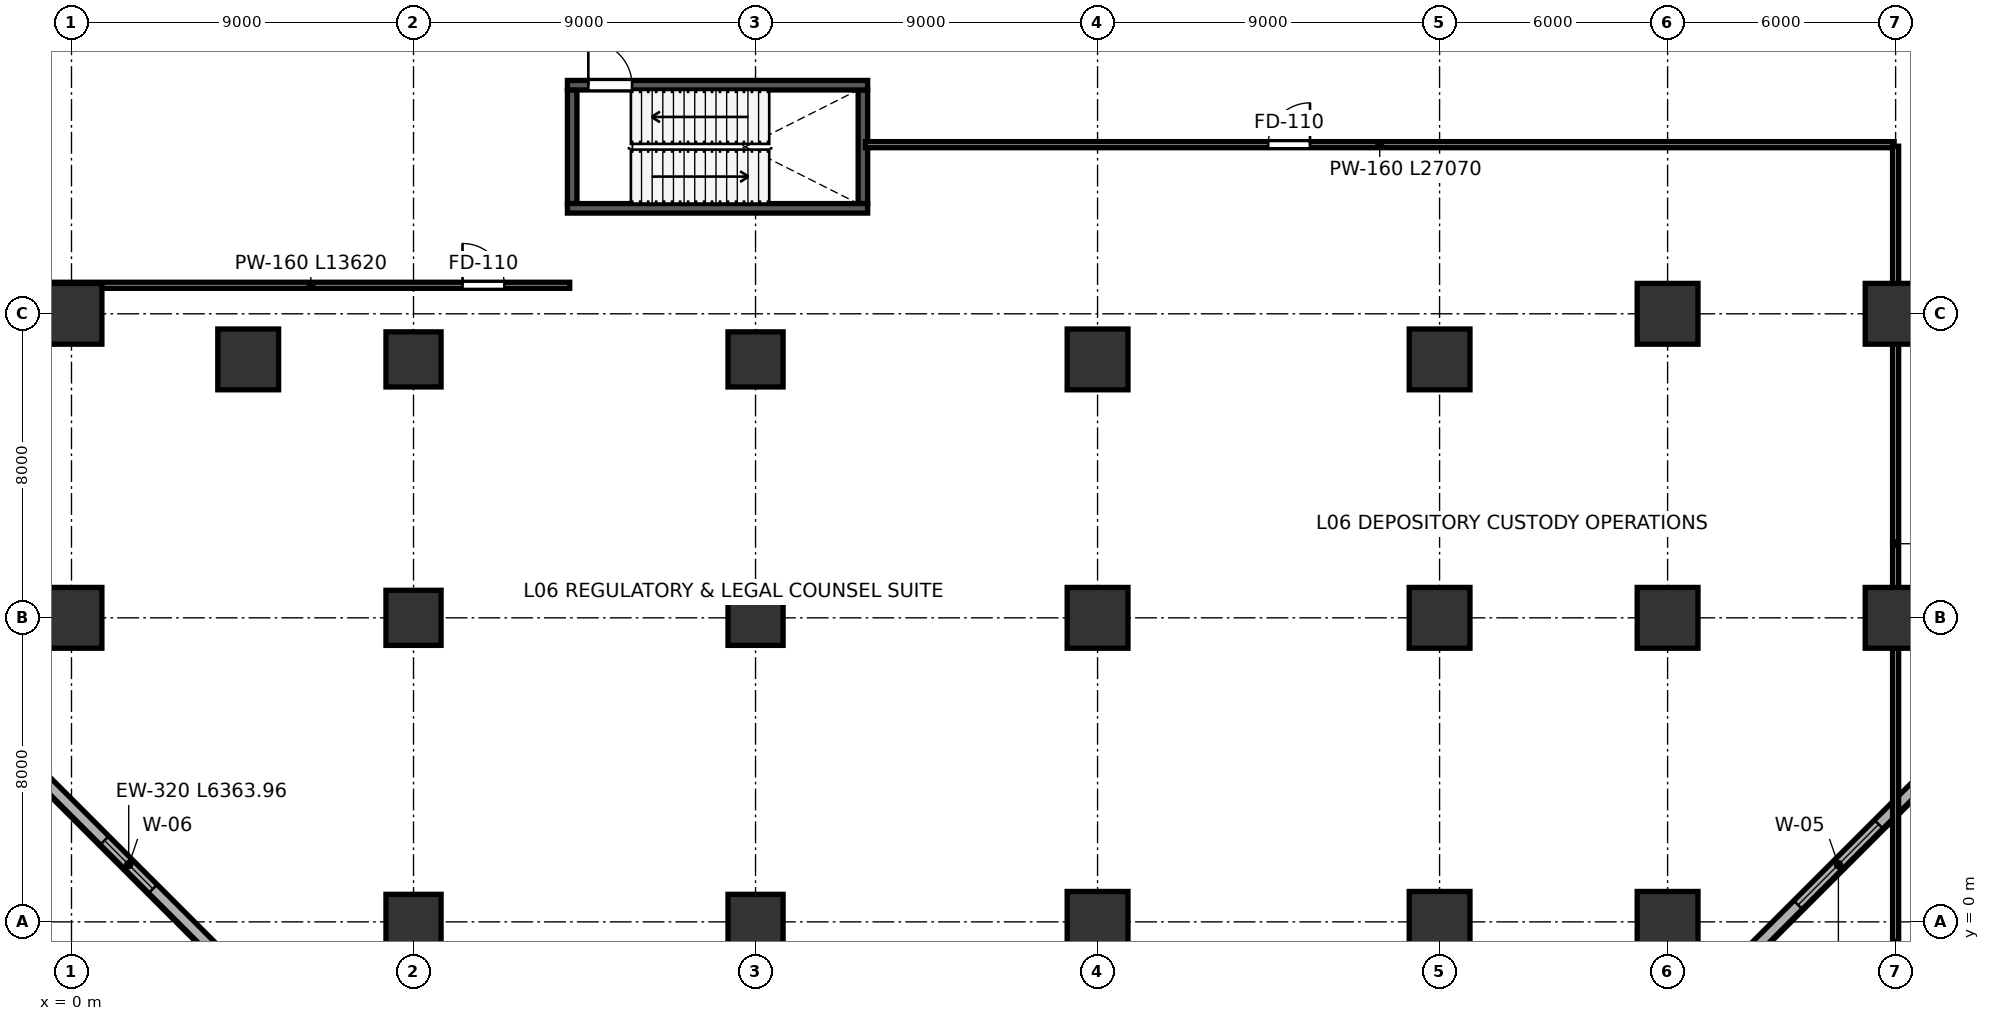
"""IFC4 building model, lengths in metres.
Left out: names, types, materials, properties, quantities, classifications, styles, units other than length and angle.
Written with IfcOpenShell. Run it as: python <this file> out.ifc"""

import sys

from ifc_helpers import new_model, si_unit, direction, frame, frame_2d, origin, origin_2d, place, context, subcontext, project, spatial, rectangle, extrude, clip, halfspace, source, transform, mapped, element, fill, save


model = new_model("IFC4")
c1 = context("Model", 3, precision=1e-05, world=origin(), true_north=direction((0.0, 1.0)))
c2 = subcontext(c1, "Body", "Model", "MODEL_VIEW")
j1 = project(units=[si_unit("LENGTHUNIT", "METRE"), si_unit("PLANEANGLEUNIT", "RADIAN")], contexts=[c1])
p1 = place(None, origin())
s1 = spatial("IfcSite", under=j1, at=p1, CompositionType="ELEMENT")
p2 = place(p1, origin())
s2 = spatial("IfcBuilding", under=s1, at=p2, CompositionType="ELEMENT")
p3 = place(p2, frame((0.0, 0.0, 28.0)))
s3 = spatial("IfcBuildingStorey", under=s2, at=p3, CompositionType="ELEMENT", Elevation=28.0)
m1 = source(origin(), c2, "Body", "SweptSolid", [
    extrude(rectangle(XDim=1.6, YDim=1.6, at=origin_2d()), origin(), (0.0, 0.0, 1.0), 4.599),
])
for number, where, z_axis, x_axis in (
    (1, (0.0, 8.0, 0.001), (0.0, 0.0, 1.0), (1.0, 0.0, 0.0)),
    (2, (0.0, 16.0, 0.001), (0.0, 0.0, 1.0), (1.0, 0.0, 0.0)),
):
    element("IfcColumn", number, at=place(p3, frame(where, z_axis=z_axis, x_axis=x_axis)), inside=s3, PredefinedType="COLUMN", context=c2, shape_type="MappedRepresentation", body=[
        mapped(m1, transform((0.0, 0.0, 0.0), scale=1.0)),
    ])
m2 = source(origin(), c2, "Body", "SweptSolid", [
    extrude(rectangle(XDim=1.45, YDim=1.45, at=origin_2d()), origin(), (0.0, 0.0, 1.0), 4.599),
])
p4 = place(p3, frame((9.0, 0.0, 0.001), z_axis=(0.0, 0.0, 1.0), x_axis=(1.0, 0.0, 0.0)))
e3 = element("IfcColumn", 3, at=p4, inside=s3, PredefinedType="COLUMN", context=c2, shape_type="MappedRepresentation", body=[
    mapped(m2, transform((0.0, 0.0, 0.0), scale=1.0)),
])
m3 = source(origin(), c2, "Body", "SweptSolid", [
    extrude(rectangle(XDim=1.45, YDim=1.45, at=origin_2d()), origin(), (0.0, 0.0, 1.0), 4.599),
])
p5 = place(p3, frame((9.0, 8.0, 0.001), z_axis=(0.0, 0.0, 1.0), x_axis=(1.0, 0.0, 0.0)))
e4 = element("IfcColumn", 4, at=p5, inside=s3, PredefinedType="COLUMN", context=c2, shape_type="MappedRepresentation", body=[
    mapped(m3, transform((0.0, 0.0, 0.0), scale=1.0)),
])
p6 = place(p3, frame((9.0, 14.8, 0.0), z_axis=(-0.151013331323, 0.114858023163, 0.981836344957), x_axis=(-0.605376865392, -0.795938974324, 0.0)))
e5 = element("IfcColumn", 5, at=p6, inside=s3, PredefinedType="COLUMN", context=c2, shape_type="Clipping", body=[
    clip(clip(extrude(rectangle(XDim=1.45, YDim=1.45, at=origin_2d()), origin(), (0.0, 0.0, 1.0), 4.889), halfspace(frame((0.0, 0.0, 0.141), z_axis=(0.0, 0.0, -1.0), x_axis=(1.0, 0.0, 0.0)), False)), halfspace(frame((0.0, 0.0, 4.748), z_axis=(0.0, 0.0, 1.0), x_axis=(1.0, 0.0, 0.0)), False)),
])
p7 = place(p3, frame((18.0, 0.0, 0.001), z_axis=(0.0, 0.0, 1.0), x_axis=(1.0, 0.0, 0.0)))
e6 = element("IfcColumn", 6, at=p7, inside=s3, PredefinedType="COLUMN", context=c2, shape_type="MappedRepresentation", body=[
    mapped(m2, transform((0.0, 0.0, 0.0), scale=1.0)),
])
p8 = place(p3, frame((18.0, 8.0, 0.001), z_axis=(0.0, 0.0, 1.0), x_axis=(1.0, 0.0, 0.0)))
e7 = element("IfcColumn", 7, at=p8, inside=s3, PredefinedType="COLUMN", context=c2, shape_type="MappedRepresentation", body=[
    mapped(m3, transform((0.0, 0.0, 0.0), scale=1.0)),
])
p9 = place(p3, frame((18.0, 14.8, 0.0), z_axis=(-0.153644648635, 0.034757141829, 0.987514690036), x_axis=(-0.220642524596, -0.975354743844, 0.0)))
e8 = element("IfcColumn", 8, at=p9, inside=s3, PredefinedType="COLUMN", context=c2, shape_type="Clipping", body=[
    clip(clip(extrude(rectangle(XDim=1.45, YDim=1.45, at=origin_2d()), origin(), (0.0, 0.0, 1.0), 4.861), halfspace(frame((0.0, 0.0, 0.116), z_axis=(0.0, 0.0, -1.0), x_axis=(1.0, 0.0, 0.0)), False)), halfspace(frame((0.0, 0.0, 4.744), z_axis=(0.0, 0.0, 1.0), x_axis=(1.0, 0.0, 0.0)), False)),
])
p10 = place(p3, frame((27.0, 0.0, 0.001), z_axis=(0.0, 0.0, 1.0), x_axis=(1.0, 0.0, 0.0)))
e9 = element("IfcColumn", 9, at=p10, inside=s3, PredefinedType="COLUMN", context=c2, shape_type="MappedRepresentation", body=[
    mapped(m1, transform((0.0, 0.0, 0.0), scale=1.0)),
])
m4 = source(origin(), c2, "Body", "SweptSolid", [
    extrude(rectangle(XDim=1.6, YDim=1.6, at=origin_2d()), origin(), (0.0, 0.0, 1.0), 4.599),
])
p11 = place(p3, frame((27.0, 8.0, 0.001), z_axis=(0.0, 0.0, 1.0), x_axis=(1.0, 0.0, 0.0)))
e10 = element("IfcColumn", 10, at=p11, inside=s3, PredefinedType="COLUMN", context=c2, shape_type="MappedRepresentation", body=[
    mapped(m4, transform((0.0, 0.0, 0.0), scale=1.0)),
])
p12 = place(p3, frame((27.0, 14.8, 0.0), z_axis=(-0.155338879297, -0.04597428544, 0.986790858114), x_axis=(0.283792954128, -0.958885581906, 0.0)))
e11 = element("IfcColumn", 11, at=p12, inside=s3, PredefinedType="COLUMN", context=c2, shape_type="Clipping", body=[
    clip(clip(extrude(rectangle(XDim=1.6, YDim=1.6, at=origin_2d()), origin(), (0.0, 0.0, 1.0), 4.864), halfspace(frame((0.0, 0.0, 0.132), z_axis=(0.0, 0.0, -1.0), x_axis=(1.0, 0.0, 0.0)), False)), halfspace(frame((0.0, 0.0, 4.732), z_axis=(0.0, 0.0, 1.0), x_axis=(1.0, 0.0, 0.0)), False)),
])
p13 = place(p3, frame((36.0, 0.0, 0.001), z_axis=(0.0, 0.0, 1.0), x_axis=(1.0, 0.0, 0.0)))
e12 = element("IfcColumn", 12, at=p13, inside=s3, PredefinedType="COLUMN", context=c2, shape_type="MappedRepresentation", body=[
    mapped(m1, transform((0.0, 0.0, 0.0), scale=1.0)),
])
p14 = place(p3, frame((36.0, 8.0, 0.001), z_axis=(0.0, 0.0, 1.0), x_axis=(1.0, 0.0, 0.0)))
e13 = element("IfcColumn", 13, at=p14, inside=s3, PredefinedType="COLUMN", context=c2, shape_type="MappedRepresentation", body=[
    mapped(m4, transform((0.0, 0.0, 0.0), scale=1.0)),
])
p15 = place(p3, frame((36.0, 24.0, 0.0), z_axis=(-0.074738817011, -0.128755970086, 0.988855909321), x_axis=(0.864855191365, -0.502021411863, 0.0)))
e14 = element("IfcColumn", 14, at=p15, inside=s3, PredefinedType="COLUMN", context=c2, shape_type="Clipping", body=[
    clip(clip(extrude(rectangle(XDim=1.6, YDim=1.6, at=origin_2d()), origin(), (0.0, 0.0, 1.0), 4.854), halfspace(frame((0.0, 0.0, 0.121), z_axis=(0.0, 0.0, -1.0), x_axis=(1.0, 0.0, 0.0)), False)), halfspace(frame((0.0, 0.0, 4.733), z_axis=(0.0, 0.0, 1.0), x_axis=(1.0, 0.0, 0.0)), False)),
])
p16 = place(p3, frame((36.0, 14.8, 0.001), z_axis=(0.0, 0.0, 1.0), x_axis=(1.0, 0.0, 0.0)))
e15 = element("IfcColumn", 15, at=p16, inside=s3, PredefinedType="COLUMN", context=c2, shape_type="MappedRepresentation", body=[
    mapped(m4, transform((0.0, 0.0, 0.0), scale=1.0)),
])
p17 = place(p3, frame((42.0, 0.0, 0.001), z_axis=(0.0, 0.0, 1.0), x_axis=(1.0, 0.0, 0.0)))
e16 = element("IfcColumn", 16, at=p17, inside=s3, PredefinedType="COLUMN", context=c2, shape_type="MappedRepresentation", body=[
    mapped(m1, transform((0.0, 0.0, 0.0), scale=1.0)),
])
m5 = source(origin(), c2, "Body", "SweptSolid", [
    extrude(rectangle(XDim=1.6, YDim=1.6, at=origin_2d()), origin(), (0.0, 0.0, 1.0), 4.799),
])
for number, where, z_axis, x_axis in (
    (17, (42.0, 8.0, 0.001), (0.0, 0.0, 1.0), (1.0, 0.0, 0.0)),
    (18, (42.0, 16.0, 0.001), (0.0, 0.0, 1.0), (1.0, 0.0, 0.0)),
):
    element("IfcColumn", number, at=place(p3, frame(where, z_axis=z_axis, x_axis=x_axis)), inside=s3, PredefinedType="COLUMN", context=c2, shape_type="MappedRepresentation", body=[
        mapped(m5, transform((0.0, 0.0, 0.0), scale=1.0)),
    ])
p18 = place(p3, frame((42.0, 24.0, 0.0), z_axis=(-0.075259886608, -0.181142417601, 0.980572982502), x_axis=(0.923467612917, -0.383676384331, 0.0)))
e19 = element("IfcColumn", 19, at=p18, inside=s3, PredefinedType="COLUMN", context=c2, shape_type="Clipping", body=[
    clip(clip(extrude(rectangle(XDim=1.6, YDim=1.6, at=origin_2d()), origin(), (0.0, 0.0, 1.0), 4.895), halfspace(frame((0.0, 0.0, 0.161), z_axis=(0.0, 0.0, -1.0), x_axis=(1.0, 0.0, 0.0)), False)), halfspace(frame((0.0, 0.0, 4.734), z_axis=(0.0, 0.0, 1.0), x_axis=(1.0, 0.0, 0.0)), False)),
])
m6 = source(origin(), c2, "Body", "SweptSolid", [
    extrude(rectangle(XDim=1.6, YDim=1.6, at=origin_2d()), origin(), (0.0, 0.0, 1.0), 4.799),
])
for number, where, z_axis, x_axis in (
    (20, (48.0, 8.0, 0.001), (0.0, 0.0, 1.0), (1.0, 0.0, 0.0)),
    (21, (48.0, 16.0, 0.001), (0.0, 0.0, 1.0), (1.0, 0.0, 0.0)),
):
    element("IfcColumn", number, at=place(p3, frame(where, z_axis=z_axis, x_axis=x_axis)), inside=s3, PredefinedType="COLUMN", context=c2, shape_type="MappedRepresentation", body=[
        mapped(m6, transform((0.0, 0.0, 0.0), scale=1.0)),
    ])
p19 = place(p3, frame((48.0, 24.0, 0.0), z_axis=(-0.07561517764, -0.231975329706, 0.969778217593), x_axis=(0.950764807949, -0.309913342672, 0.0)))
e22 = element("IfcColumn", 22, at=p19, inside=s3, PredefinedType="COLUMN", context=c2, shape_type="Clipping", body=[
    clip(clip(extrude(rectangle(XDim=1.6, YDim=1.6, at=origin_2d()), origin(), (0.0, 0.0, 1.0), 4.95), halfspace(frame((0.0, 0.0, 0.202), z_axis=(0.0, 0.0, -1.0), x_axis=(1.0, 0.0, 0.0)), False)), halfspace(frame((0.0, 0.0, 4.748), z_axis=(0.0, 0.0, 1.0), x_axis=(1.0, 0.0, 0.0)), False)),
])
p20 = place(p3, frame((4.65, 14.8, 0.001), z_axis=(0.0, 0.0, 1.0), x_axis=(1.0, 0.0, 0.0)))
e23 = element("IfcColumn", 23, at=p20, inside=s3, PredefinedType="COLUMN", context=c2, shape_type="MappedRepresentation", body=[
    mapped(m4, transform((0.0, 0.0, 0.0), scale=1.0)),
])
p21 = place(p3, frame((44.244, -0.744, 0.0), z_axis=(0.0, 0.0, 1.0), x_axis=(0.707106781187, 0.707106781187, 0.0)))
e24 = element("IfcWall", 24, at=p21, inside=s3, PredefinedType="SOLIDWALL", context=c2, shape_type="SweptSolid", body=[
    extrude(rectangle(XDim=6.364, YDim=0.32, at=frame_2d((3.182, 0.0))), origin(), (0.0, 0.0, 1.0), 4.56),
])
p22 = place(p21, frame((1.682, 0.0, 0.65)))
e25 = element("IfcOpeningElement", 25, at=p22, cuts=e24, PredefinedType="OPENING", context=c2, shape_type="SweptSolid", body=[
    extrude(rectangle(XDim=3.0, YDim=2.4, at=frame_2d((1.5, 1.2))), frame((0.0, 0.17, 0.0), z_axis=(0.0, -1.0, 0.0), x_axis=(1.0, 0.0, 0.0)), (0.0, 0.0, 1.0), 0.34),
])
p23 = place(p3, frame((-0.744, 3.756, 0.0), z_axis=(0.0, 0.0, 1.0), x_axis=(0.707106781187, -0.707106781187, 0.0)))
e26 = element("IfcWall", 26, at=p23, inside=s3, PredefinedType="SOLIDWALL", context=c2, shape_type="SweptSolid", body=[
    extrude(rectangle(XDim=6.364, YDim=0.32, at=frame_2d((3.182, 0.0))), origin(), (0.0, 0.0, 1.0), 4.56),
])
p24 = place(p23, frame((2.282, 0.0, 0.65)))
e27 = element("IfcOpeningElement", 27, at=p24, cuts=e26, PredefinedType="OPENING", context=c2, shape_type="SweptSolid", body=[
    extrude(rectangle(XDim=1.8, YDim=2.1, at=frame_2d((0.9, 1.05))), frame((0.0, 0.17, 0.0), z_axis=(0.0, -1.0, 0.0), x_axis=(1.0, 0.0, 0.0)), (0.0, 0.0, 1.0), 0.34),
])
for number, where, z_axis, x_axis in (
    (28, (13.175, 18.9, 0.0), (0.0, 0.0, 1.0), (0.0, 1.0, 0.0)),
    (29, (20.825, 18.9, 0.0), (0.0, 0.0, 1.0), (0.0, 1.0, 0.0)),
):
    element("IfcWall", number, at=place(p3, frame(where, z_axis=z_axis, x_axis=x_axis)), inside=s3, PredefinedType="SHEAR", context=c2, shape_type="SweptSolid", body=[
        extrude(rectangle(XDim=2.99, YDim=0.25, at=frame_2d((1.495, 0.0))), origin(), (0.0, 0.0, 1.0), 4.56),
    ])
p25 = place(p3, frame((13.05, 18.775, 0.0), z_axis=(0.0, 0.0, 1.0), x_axis=(1.0, 0.0, 0.0)))
e30 = element("IfcWall", 30, at=p25, inside=s3, PredefinedType="SHEAR", context=c2, shape_type="SweptSolid", body=[
    extrude(rectangle(XDim=7.9, YDim=0.25, at=frame_2d((3.95, 0.0))), origin(), (0.0, 0.0, 1.0), 4.56),
])
p26 = place(p3, frame((13.05, 22.015, 0.0), z_axis=(0.0, 0.0, 1.0), x_axis=(1.0, 0.0, 0.0)))
e31 = element("IfcWall", 31, at=p26, inside=s3, PredefinedType="SHEAR", context=c2, shape_type="SweptSolid", body=[
    extrude(rectangle(XDim=7.9, YDim=0.25, at=frame_2d((3.95, 0.0))), origin(), (0.0, 0.0, 1.0), 4.56),
])
p27 = place(p26, frame((0.55, 0.0, 0.0)))
e32 = element("IfcOpeningElement", 32, at=p27, cuts=e31, PredefinedType="OPENING", context=c2, shape_type="SweptSolid", body=[
    extrude(rectangle(XDim=1.15, YDim=2.2, at=frame_2d((0.575, 1.1))), frame((0.0, 0.135, 0.0), z_axis=(0.0, -1.0, 0.0), x_axis=(1.0, 0.0, 0.0)), (0.0, 0.0, 1.0), 0.27),
])
p28 = place(p3, frame((-0.51, 16.75, 0.0), z_axis=(0.0, 0.0, 1.0), x_axis=(1.0, 0.0, 0.0)))
e33 = element("IfcWall", 33, at=p28, inside=s3, PredefinedType="PARTITIONING", context=c2, shape_type="SweptSolid", body=[
    extrude(rectangle(XDim=13.62, YDim=0.16, at=frame_2d((6.81, 0.0))), origin(), (0.0, 0.0, 1.0), 4.56),
])
p29 = place(p28, frame((10.8, 0.0, 0.0)))
e34 = element("IfcOpeningElement", 34, at=p29, cuts=e33, PredefinedType="OPENING", context=c2, shape_type="SweptSolid", body=[
    extrude(rectangle(XDim=1.1, YDim=2.2, at=frame_2d((0.55, 1.1))), frame((0.0, 0.09, 0.0), z_axis=(0.0, -1.0, 0.0), x_axis=(1.0, 0.0, 0.0)), (0.0, 0.0, 1.0), 0.18),
])
p30 = place(p3, frame((20.89, 20.45, 0.0), z_axis=(0.0, 0.0, 1.0), x_axis=(1.0, 0.0, 0.0)))
e35 = element("IfcWall", 35, at=p30, inside=s3, PredefinedType="PARTITIONING", context=c2, shape_type="SweptSolid", body=[
    extrude(rectangle(XDim=27.07, YDim=0.16, at=frame_2d((13.535, 0.0))), origin(), (0.0, 0.0, 1.0), 4.56),
])
p31 = place(p30, frame((10.6, 0.0, 0.0)))
e36 = element("IfcOpeningElement", 36, at=p31, cuts=e35, PredefinedType="OPENING", context=c2, shape_type="SweptSolid", body=[
    extrude(rectangle(XDim=1.1, YDim=2.2, at=frame_2d((0.55, 1.1))), frame((0.0, 0.09, 0.0), z_axis=(0.0, -1.0, 0.0), x_axis=(1.0, 0.0, 0.0)), (0.0, 0.0, 1.0), 0.18),
])
p32 = place(p3, frame((48.0, -0.51, 0.0), z_axis=(0.0, 0.0, 1.0), x_axis=(0.0, 1.0, 0.0)))
e37 = element("IfcWall", 37, at=p32, inside=s3, PredefinedType="PARTITIONING", context=c2, shape_type="SweptSolid", body=[
    extrude(rectangle(XDim=20.92, YDim=0.16, at=frame_2d((10.46, 0.0))), origin(), (0.0, 0.0, 1.0), 3.792),
])
m7 = source(origin(), c2, "Body", "SweptSolid", [
    extrude(rectangle(XDim=3.0, YDim=2.4, at=frame_2d((1.5, 1.2))), frame((0.0, 0.03, 0.0), z_axis=(0.0, -1.0, 0.0), x_axis=(1.0, 0.0, 0.0)), (0.0, 0.0, 1.0), 0.06),
])
p33 = place(p22, origin())
e38 = element("IfcWindow", 38, at=p33, inside=s3, PartitioningType="TRIPLE_PANEL_VERTICAL", PredefinedType="WINDOW", context=c2, shape_type="MappedRepresentation", body=[
    mapped(m7, transform((0.0, 0.0, 0.0), scale=1.0)),
])
fill(e25, e38)
m8 = source(origin(), c2, "Body", "SweptSolid", [
    extrude(rectangle(XDim=1.8, YDim=2.1, at=frame_2d((0.9, 1.05))), frame((0.0, 0.03, 0.0), z_axis=(0.0, -1.0, 0.0), x_axis=(1.0, 0.0, 0.0)), (0.0, 0.0, 1.0), 0.06),
])
p34 = place(p24, origin())
e39 = element("IfcWindow", 39, at=p34, inside=s3, PartitioningType="SINGLE_PANEL", PredefinedType="WINDOW", context=c2, shape_type="MappedRepresentation", body=[
    mapped(m8, transform((0.0, 0.0, 0.0), scale=1.0)),
])
fill(e27, e39)
m9 = source(origin(), c2, "Body", "SweptSolid", [
    extrude(rectangle(XDim=1.15, YDim=2.2, at=frame_2d((0.575, 1.1))), frame((0.0, 0.025, 0.0), z_axis=(0.0, -1.0, 0.0), x_axis=(1.0, 0.0, 0.0)), (0.0, 0.0, 1.0), 0.05),
])
p35 = place(p27, origin())
e40 = element("IfcDoor", 40, at=p35, inside=s3, OperationType="SINGLE_SWING_LEFT", PredefinedType="DOOR", context=c2, shape_type="MappedRepresentation", body=[
    mapped(m9, transform((0.0, 0.0, 0.0), scale=1.0)),
])
fill(e32, e40)
m10 = source(origin(), c2, "Body", "SweptSolid", [
    extrude(rectangle(XDim=1.1, YDim=2.2, at=frame_2d((0.55, 1.1))), frame((0.0, 0.025, 0.0), z_axis=(0.0, -1.0, 0.0), x_axis=(1.0, 0.0, 0.0)), (0.0, 0.0, 1.0), 0.05),
])
p36 = place(p29, origin())
e41 = element("IfcDoor", 41, at=p36, inside=s3, OperationType="SINGLE_SWING_LEFT", PredefinedType="DOOR", context=c2, shape_type="MappedRepresentation", body=[
    mapped(m10, transform((0.0, 0.0, 0.0), scale=1.0)),
])
fill(e34, e41)
p37 = place(p31, origin())
e42 = element("IfcDoor", 42, at=p37, inside=s3, OperationType="SINGLE_SWING_RIGHT", PredefinedType="DOOR", context=c2, shape_type="MappedRepresentation", body=[
    mapped(m10, transform((0.0, 0.0, 0.0), scale=1.0)),
])
fill(e36, e42)
save(model, sys.argv[1])
